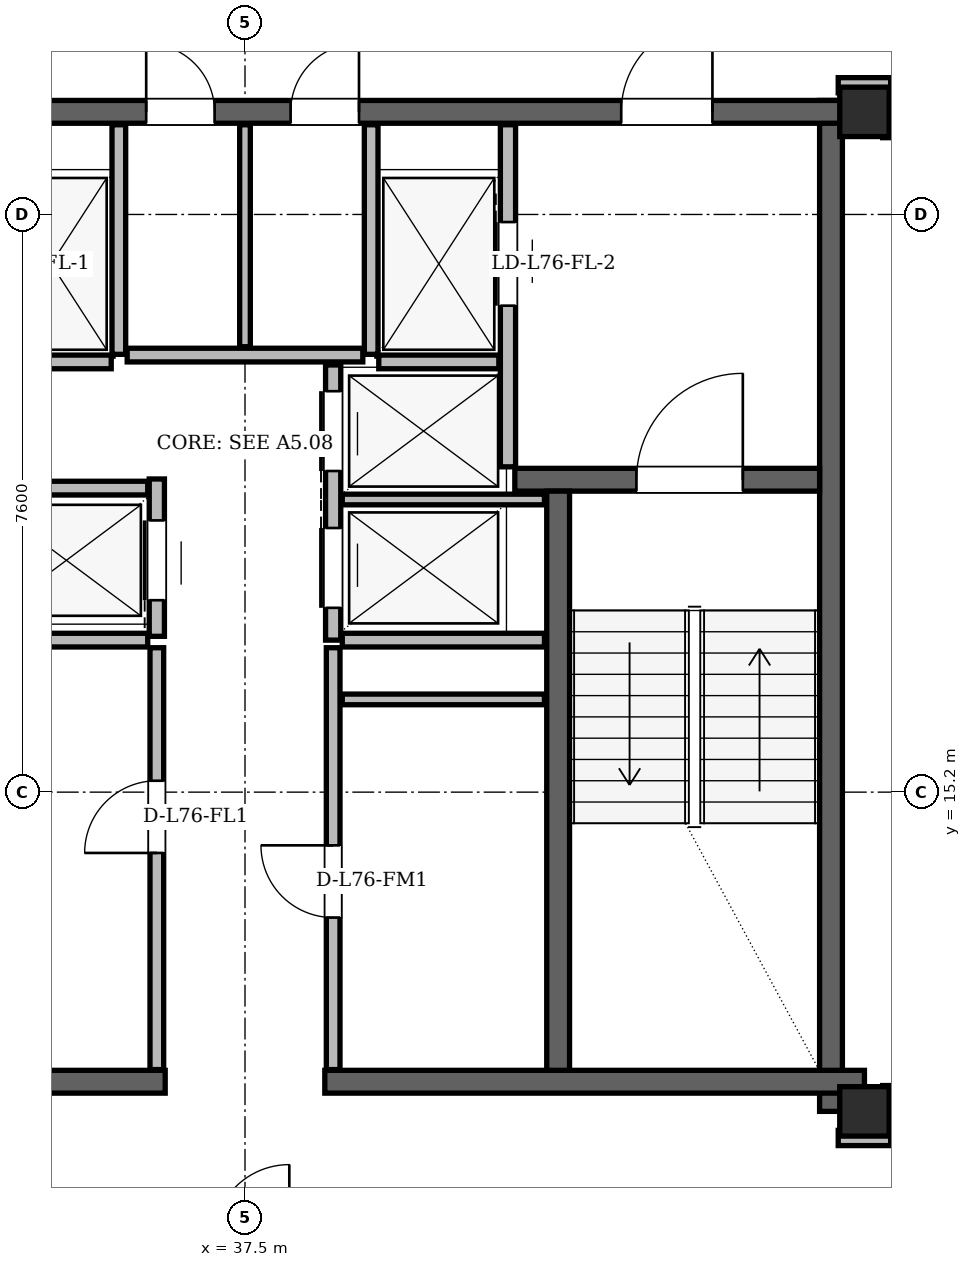
"""IFC4 building model, lengths in metres.
Left out: names, types, materials, properties, quantities, classifications, styles, units other than length and angle.
Written with IfcOpenShell. Run it as: python <this file> out.ifc"""

import sys

from ifc_helpers import new_model, si_unit, direction, frame, frame_2d, origin, origin_2d, place, context, subcontext, project, spatial, rectangle, hollow_rectangle, extrude, element, fill, save


model = new_model("IFC4")
c1 = context("Model", 3, precision=1e-05, world=origin(), true_north=direction((0.0, 1.0)))
c2 = subcontext(c1, "Body", "Model", "MODEL_VIEW")
j1 = project(units=[si_unit("LENGTHUNIT", "METRE"), si_unit("PLANEANGLEUNIT", "RADIAN")], contexts=[c1])
p1 = place(None, origin())
s1 = spatial("IfcSite", under=j1, at=p1, CompositionType="ELEMENT")
p2 = place(p1, origin())
s2 = spatial("IfcBuilding", under=s1, at=p2, CompositionType="ELEMENT")
p3 = place(p2, frame((0.0, 0.0, 288.9)))
s3 = spatial("IfcBuildingStorey", under=s2, at=p3, CompositionType="ELEMENT", Elevation=288.9)
for number, where, z_axis, x_axis in (
    (1, (45.65, 11.0, 0.0), (0.0, 0.0, 1.0), (1.0, 0.0, 0.0)),
    (2, (45.65, 24.15, 0.0), (0.0, 0.0, 1.0), (1.0, 0.0, 0.0)),
):
    element("IfcColumn", number, at=place(p3, frame(where, z_axis=z_axis, x_axis=x_axis)), inside=s3, PredefinedType="COLUMN", context=c2, shape_type="SweptSolid", body=[
        extrude(hollow_rectangle(XDim=0.65, YDim=0.65, WallThickness=0.05, at=origin_2d()), origin(), (0.0, 0.0, 1.0), 3.9),
    ])
p4 = place(p3, frame((45.21, 11.0, 0.0), z_axis=(0.0, 0.0, 1.0), x_axis=(0.0, 1.0, 0.0)))
e3 = element("IfcWall", 3, at=p4, inside=s3, PredefinedType="SHEAR", context=c2, shape_type="SweptSolid", body=[
    extrude(rectangle(XDim=13.3, YDim=0.3, at=frame_2d((6.65, 0.0))), origin(), (0.0, 0.0, 1.0), 3.68),
])
for number, where, z_axis, x_axis in (
    (4, (29.35, 11.39, 0.0), (0.0, 0.0, 1.0), (1.0, 0.0, 0.0)),
    (5, (38.55, 11.39, 0.0), (0.0, 0.0, 1.0), (1.0, 0.0, 0.0)),
):
    element("IfcWall", number, at=place(p3, frame(where, z_axis=z_axis, x_axis=x_axis)), inside=s3, PredefinedType="SHEAR", context=c2, shape_type="SweptSolid", body=[
        extrude(rectangle(XDim=7.1, YDim=0.3, at=frame_2d((3.55, 0.0))), origin(), (0.0, 0.0, 1.0), 3.68),
    ])
p5 = place(p3, frame((29.65, 24.15, 0.0), z_axis=(0.0, 0.0, 1.0), x_axis=(1.0, 0.0, 0.0)))
e6 = element("IfcWall", 6, at=p5, inside=s3, PredefinedType="SHEAR", context=c2, shape_type="SweptSolid", body=[
    extrude(rectangle(XDim=15.7, YDim=0.3, at=frame_2d((7.85, 0.0))), origin(), (0.0, 0.0, 1.0), 3.68),
])
p6 = place(p5, frame((1.7, 0.0, 0.0)))
e7 = element("IfcOpeningElement", 7, at=p6, cuts=e6, PredefinedType="OPENING", context=c2, shape_type="SweptSolid", body=[
    extrude(rectangle(XDim=1.2, YDim=2.2, at=frame_2d((0.6, 1.1))), frame((0.0, 0.15, 0.0), z_axis=(0.0, -1.0, 0.0), x_axis=(1.0, 0.0, 0.0)), (0.0, 0.0, 1.0), 0.3),
])
p7 = place(p5, frame((12.8, 0.0, 0.0)))
e8 = element("IfcOpeningElement", 8, at=p7, cuts=e6, PredefinedType="OPENING", context=c2, shape_type="SweptSolid", body=[
    extrude(rectangle(XDim=1.2, YDim=2.2, at=frame_2d((0.6, 1.1))), frame((0.0, 0.15, 0.0), z_axis=(0.0, -1.0, 0.0), x_axis=(1.0, 0.0, 0.0)), (0.0, 0.0, 1.0), 0.3),
])
p8 = place(p5, frame((6.55, 0.0, 0.0)))
e9 = element("IfcOpeningElement", 9, at=p8, cuts=e6, PredefinedType="OPENING", context=c2, shape_type="SweptSolid", body=[
    extrude(rectangle(XDim=0.9, YDim=2.05, at=frame_2d((0.45, 1.025))), frame((0.0, 0.15, 0.0), z_axis=(0.0, -1.0, 0.0), x_axis=(1.0, 0.0, 0.0)), (0.0, 0.0, 1.0), 0.3),
])
p9 = place(p5, frame((8.45, 0.0, 0.0)))
e10 = element("IfcOpeningElement", 10, at=p9, cuts=e6, PredefinedType="OPENING", context=c2, shape_type="SweptSolid", body=[
    extrude(rectangle(XDim=0.9, YDim=2.05, at=frame_2d((0.45, 1.025))), frame((0.0, 0.15, 0.0), z_axis=(0.0, -1.0, 0.0), x_axis=(1.0, 0.0, 0.0)), (0.0, 0.0, 1.0), 0.3),
])
p10 = place(p3, frame((41.05, 19.31, 0.0), z_axis=(0.0, 0.0, 1.0), x_axis=(1.0, 0.0, 0.0)))
e11 = element("IfcWall", 11, at=p10, inside=s3, PredefinedType="SHEAR", context=c2, shape_type="SweptSolid", body=[
    extrude(rectangle(XDim=4.01, YDim=0.3, at=frame_2d((2.005, 0.0))), origin(), (0.0, 0.0, 1.0), 3.68),
])
p11 = place(p10, frame((1.6, 0.0, 0.0)))
e12 = element("IfcOpeningElement", 12, at=p11, cuts=e11, PredefinedType="OPENING", context=c2, shape_type="SweptSolid", body=[
    extrude(rectangle(XDim=1.4, YDim=2.2, at=frame_2d((0.7, 1.1))), frame((0.0, 0.15, 0.0), z_axis=(0.0, -1.0, 0.0), x_axis=(1.0, 0.0, 0.0)), (0.0, 0.0, 1.0), 0.3),
])
p12 = place(p3, frame((41.62, 11.54, 0.0), z_axis=(0.0, 0.0, 1.0), x_axis=(0.0, 1.0, 0.0)))
e13 = element("IfcWall", 13, at=p12, inside=s3, PredefinedType="SHEAR", context=c2, shape_type="SweptSolid", body=[
    extrude(rectangle(XDim=7.62, YDim=0.3, at=frame_2d((3.81, 0.0))), origin(), (0.0, 0.0, 1.0), 3.68),
])
p13 = place(p3, frame((35.387, 42.986, 0.0), z_axis=(0.0, 0.0, 1.0), x_axis=(-0.499995967686, -0.86602773183, 0.0)))
e14 = element("IfcWall", 14, at=p13, inside=s3, PredefinedType="SOLIDWALL", context=c2, shape_type="SweptSolid", body=[
    extrude(rectangle(XDim=37.526, YDim=0.29, at=frame_2d((18.763, 0.0))), origin(), (0.0, 0.0, 1.0), 3.058),
])
p14 = place(p13, frame((3.74, 0.0, 0.0)))
e15 = element("IfcOpeningElement", 15, at=p14, cuts=e14, PredefinedType="OPENING", context=c2, shape_type="SweptSolid", body=[
    extrude(rectangle(XDim=1.3, YDim=2.2, at=frame_2d((0.65, 1.1))), frame((0.0, 0.145, 0.0), z_axis=(0.0, -1.0, 0.0), x_axis=(1.0, 0.0, 0.0)), (0.0, 0.0, 1.0), 0.29),
])
p15 = place(p13, frame((27.991, 0.0, 0.0)))
e16 = element("IfcOpeningElement", 16, at=p15, cuts=e14, PredefinedType="OPENING", context=c2, shape_type="SweptSolid", body=[
    extrude(rectangle(XDim=1.5, YDim=2.2, at=frame_2d((0.75, 1.1))), frame((0.0, 0.145, 0.0), z_axis=(0.0, -1.0, 0.0), x_axis=(1.0, 0.0, 0.0)), (0.0, 0.0, 1.0), 0.29),
])
p16 = place(p13, frame((35.454, 0.0, 0.85)))
e17 = element("IfcOpeningElement", 17, at=p16, cuts=e14, PredefinedType="OPENING", context=c2, shape_type="SweptSolid", body=[
    extrude(rectangle(XDim=1.2, YDim=1.48, at=frame_2d((0.6, 0.74))), frame((0.0, 0.145, 0.0), z_axis=(0.0, -1.0, 0.0), x_axis=(1.0, 0.0, 0.0)), (0.0, 0.0, 1.0), 0.29),
])
p17 = place(p13, frame((33.674, 0.0, 0.85)))
e18 = element("IfcOpeningElement", 18, at=p17, cuts=e14, PredefinedType="OPENING", context=c2, shape_type="SweptSolid", body=[
    extrude(rectangle(XDim=1.2, YDim=1.48, at=frame_2d((0.6, 0.74))), frame((0.0, 0.145, 0.0), z_axis=(0.0, -1.0, 0.0), x_axis=(1.0, 0.0, 0.0)), (0.0, 0.0, 1.0), 0.29),
])
p18 = place(p13, frame((21.746, 0.0, 0.85)))
e19 = element("IfcOpeningElement", 19, at=p18, cuts=e14, PredefinedType="OPENING", context=c2, shape_type="SweptSolid", body=[
    extrude(rectangle(XDim=1.6, YDim=1.7, at=frame_2d((0.8, 0.85))), frame((0.0, 0.145, 0.0), z_axis=(0.0, -1.0, 0.0), x_axis=(1.0, 0.0, 0.0)), (0.0, 0.0, 1.0), 0.29),
])
p19 = place(p13, frame((8.642, 0.0, 0.85)))
e20 = element("IfcOpeningElement", 20, at=p19, cuts=e14, PredefinedType="OPENING", context=c2, shape_type="SweptSolid", body=[
    extrude(rectangle(XDim=1.2, YDim=1.48, at=frame_2d((0.6, 0.74))), frame((0.0, 0.145, 0.0), z_axis=(0.0, -1.0, 0.0), x_axis=(1.0, 0.0, 0.0)), (0.0, 0.0, 1.0), 0.29),
])
p20 = place(p13, frame((16.523, 0.0, 0.85)))
e21 = element("IfcOpeningElement", 21, at=p20, cuts=e14, PredefinedType="OPENING", context=c2, shape_type="SweptSolid", body=[
    extrude(rectangle(XDim=1.8, YDim=1.75, at=frame_2d((0.9, 0.875))), frame((0.0, 0.145, 0.0), z_axis=(0.0, -1.0, 0.0), x_axis=(1.0, 0.0, 0.0)), (0.0, 0.0, 1.0), 0.29),
])
p21 = place(p13, frame((6.715, 0.0, 0.85)))
e22 = element("IfcOpeningElement", 22, at=p21, cuts=e14, PredefinedType="OPENING", context=c2, shape_type="SweptSolid", body=[
    extrude(rectangle(XDim=1.2, YDim=1.48, at=frame_2d((0.6, 0.74))), frame((0.0, 0.145, 0.0), z_axis=(0.0, -1.0, 0.0), x_axis=(1.0, 0.0, 0.0)), (0.0, 0.0, 1.0), 0.29),
])
p22 = place(p13, frame((1.125, 0.0, 0.85)))
e23 = element("IfcOpeningElement", 23, at=p22, cuts=e14, PredefinedType="OPENING", context=c2, shape_type="SweptSolid", body=[
    extrude(rectangle(XDim=1.2, YDim=1.48, at=frame_2d((0.6, 0.74))), frame((0.0, 0.145, 0.0), z_axis=(0.0, -1.0, 0.0), x_axis=(1.0, 0.0, 0.0)), (0.0, 0.0, 1.0), 0.29),
])
p23 = place(p3, frame((35.84, 20.96, 0.0), z_axis=(0.0, 0.0, 1.0), x_axis=(0.0, 1.0, 0.0)))
e24 = element("IfcWall", 24, at=p23, inside=s3, PredefinedType="PARTITIONING", context=c2, shape_type="SweptSolid", body=[
    extrude(rectangle(XDim=3.02, YDim=0.18, at=frame_2d((1.51, 0.0))), origin(), (0.0, 0.0, 1.0), 3.68),
])
p24 = place(p3, frame((34.16, 20.86, 0.0), z_axis=(0.0, 0.0, 1.0), x_axis=(1.0, 0.0, 0.0)))
e25 = element("IfcWall", 25, at=p24, inside=s3, PredefinedType="PARTITIONING", context=c2, shape_type="SweptSolid", body=[
    extrude(rectangle(XDim=1.58, YDim=0.18, at=frame_2d((0.79, 0.0))), origin(), (0.0, 0.0, 1.0), 3.68),
])
p25 = place(p3, frame((40.96, 19.48, 0.0), z_axis=(0.0, 0.0, 1.0), x_axis=(0.0, 1.0, 0.0)))
e26 = element("IfcWall", 26, at=p25, inside=s3, PredefinedType="PARTITIONING", context=c2, shape_type="SweptSolid", body=[
    extrude(rectangle(XDim=4.5, YDim=0.2, at=frame_2d((2.25, 0.0))), origin(), (0.0, 0.0, 1.0), 3.68),
])
p26 = place(p25, frame((2.12, 0.0, 0.0)))
e27 = element("IfcOpeningElement", 27, at=p26, cuts=e26, PredefinedType="OPENING", context=c2, shape_type="SweptSolid", body=[
    extrude(rectangle(XDim=1.1, YDim=2.2, at=frame_2d((0.55, 1.1))), frame((0.0, 0.1, 0.0), z_axis=(0.0, -1.0, 0.0), x_axis=(1.0, 0.0, 0.0)), (0.0, 0.0, 1.0), 0.2),
])
p27 = place(p3, frame((39.16, 20.96, 0.0), z_axis=(0.0, 0.0, 1.0), x_axis=(0.0, 1.0, 0.0)))
e28 = element("IfcWall", 28, at=p27, inside=s3, PredefinedType="PARTITIONING", context=c2, shape_type="SweptSolid", body=[
    extrude(rectangle(XDim=3.02, YDim=0.18, at=frame_2d((1.51, 0.0))), origin(), (0.0, 0.0, 1.0), 3.68),
])
p28 = place(p3, frame((39.26, 20.86, 0.0), z_axis=(0.0, 0.0, 1.0), x_axis=(1.0, 0.0, 0.0)))
e29 = element("IfcWall", 29, at=p28, inside=s3, PredefinedType="PARTITIONING", context=c2, shape_type="SweptSolid", body=[
    extrude(rectangle(XDim=1.58, YDim=0.18, at=frame_2d((0.79, 0.0))), origin(), (0.0, 0.0, 1.0), 3.68),
])
p29 = place(p3, frame((36.34, 17.25, 0.0), z_axis=(0.0, 0.0, 1.0), x_axis=(0.0, 1.0, 0.0)))
e30 = element("IfcWall", 30, at=p29, inside=s3, PredefinedType="PARTITIONING", context=c2, shape_type="SweptSolid", body=[
    extrude(rectangle(XDim=2.07, YDim=0.2, at=frame_2d((1.035, 0.0))), origin(), (0.0, 0.0, 1.0), 3.68),
])
p30 = place(p29, frame((0.475, 0.0, 0.0)))
e31 = element("IfcOpeningElement", 31, at=p30, cuts=e30, PredefinedType="OPENING", context=c2, shape_type="SweptSolid", body=[
    extrude(rectangle(XDim=1.05, YDim=2.15, at=frame_2d((0.525, 1.075))), frame((0.0, 0.1, 0.0), z_axis=(0.0, -1.0, 0.0), x_axis=(1.0, 0.0, 0.0)), (0.0, 0.0, 1.0), 0.2),
])
p31 = place(p3, frame((33.95, 19.2, 0.0), z_axis=(0.0, 0.0, 1.0), x_axis=(1.0, 0.0, 0.0)))
e32 = element("IfcWall", 32, at=p31, inside=s3, PredefinedType="PARTITIONING", context=c2, shape_type="SweptSolid", body=[
    extrude(rectangle(XDim=2.27, YDim=0.18, at=frame_2d((1.135, 0.0))), origin(), (0.0, 0.0, 1.0), 3.68),
])
p32 = place(p3, frame((33.56, 17.2, 0.0), z_axis=(0.0, 0.0, 1.0), x_axis=(1.0, 0.0, 0.0)))
e33 = element("IfcWall", 33, at=p32, inside=s3, PredefinedType="PARTITIONING", context=c2, shape_type="SweptSolid", body=[
    extrude(rectangle(XDim=2.66, YDim=0.18, at=frame_2d((1.33, 0.0))), origin(), (0.0, 0.0, 1.0), 3.68),
])
p33 = place(p3, frame((36.34, 11.55, 0.0), z_axis=(0.0, 0.0, 1.0), x_axis=(0.0, 1.0, 0.0)))
e34 = element("IfcWall", 34, at=p33, inside=s3, PredefinedType="PARTITIONING", context=c2, shape_type="SweptSolid", body=[
    extrude(rectangle(XDim=5.55, YDim=0.18, at=frame_2d((2.775, 0.0))), origin(), (0.0, 0.0, 1.0), 3.68),
])
p34 = place(p33, frame((2.85, 0.0, 0.0)))
e35 = element("IfcOpeningElement", 35, at=p34, cuts=e34, PredefinedType="OPENING", context=c2, shape_type="SweptSolid", body=[
    extrude(rectangle(XDim=0.95, YDim=2.1, at=frame_2d((0.475, 1.05))), frame((0.0, 0.09, 0.0), z_axis=(0.0, -1.0, 0.0), x_axis=(1.0, 0.0, 0.0)), (0.0, 0.0, 1.0), 0.18),
])
p35 = place(p3, frame((38.66, 17.2, 0.0), z_axis=(0.0, 0.0, 1.0), x_axis=(0.0, 1.0, 0.0)))
e36 = element("IfcWall", 36, at=p35, inside=s3, PredefinedType="PARTITIONING", context=c2, shape_type="SweptSolid", body=[
    extrude(rectangle(XDim=3.62, YDim=0.2, at=frame_2d((1.81, 0.0))), origin(), (0.0, 0.0, 1.0), 3.68),
])
p36 = place(p35, frame((0.425, 0.0, 0.0)))
e37 = element("IfcOpeningElement", 37, at=p36, cuts=e36, PredefinedType="OPENING", context=c2, shape_type="SweptSolid", body=[
    extrude(rectangle(XDim=1.05, YDim=2.15, at=frame_2d((0.525, 1.075))), frame((0.0, 0.1, 0.0), z_axis=(0.0, -1.0, 0.0), x_axis=(1.0, 0.0, 0.0)), (0.0, 0.0, 1.0), 0.2),
])
p37 = place(p35, frame((2.225, 0.0, 0.0)))
e38 = element("IfcOpeningElement", 38, at=p37, cuts=e36, PredefinedType="OPENING", context=c2, shape_type="SweptSolid", body=[
    extrude(rectangle(XDim=1.05, YDim=2.15, at=frame_2d((0.525, 1.075))), frame((0.0, 0.1, 0.0), z_axis=(0.0, -1.0, 0.0), x_axis=(1.0, 0.0, 0.0)), (0.0, 0.0, 1.0), 0.2),
])
p38 = place(p3, frame((38.78, 17.2, 0.0), z_axis=(0.0, 0.0, 1.0), x_axis=(1.0, 0.0, 0.0)))
e39 = element("IfcWall", 39, at=p38, inside=s3, PredefinedType="PARTITIONING", context=c2, shape_type="SweptSolid", body=[
    extrude(rectangle(XDim=2.66, YDim=0.18, at=frame_2d((1.33, 0.0))), origin(), (0.0, 0.0, 1.0), 3.68),
])
p39 = place(p3, frame((38.78, 19.05, 0.0), z_axis=(0.0, 0.0, 1.0), x_axis=(1.0, 0.0, 0.0)))
e40 = element("IfcWall", 40, at=p39, inside=s3, PredefinedType="PARTITIONING", context=c2, shape_type="SweptSolid", body=[
    extrude(rectangle(XDim=2.66, YDim=0.14, at=frame_2d((1.33, 0.0))), origin(), (0.0, 0.0, 1.0), 3.68),
])
p40 = place(p3, frame((38.66, 11.55, 0.0), z_axis=(0.0, 0.0, 1.0), x_axis=(0.0, 1.0, 0.0)))
e41 = element("IfcWall", 41, at=p40, inside=s3, PredefinedType="PARTITIONING", context=c2, shape_type="SweptSolid", body=[
    extrude(rectangle(XDim=5.55, YDim=0.18, at=frame_2d((2.775, 0.0))), origin(), (0.0, 0.0, 1.0), 3.68),
])
p41 = place(p40, frame((2.0, 0.0, 0.0)))
e42 = element("IfcOpeningElement", 42, at=p41, cuts=e41, PredefinedType="OPENING", context=c2, shape_type="SweptSolid", body=[
    extrude(rectangle(XDim=0.95, YDim=2.1, at=frame_2d((0.475, 1.05))), frame((0.0, 0.09, 0.0), z_axis=(0.0, -1.0, 0.0), x_axis=(1.0, 0.0, 0.0)), (0.0, 0.0, 1.0), 0.18),
])
p42 = place(p3, frame((38.78, 16.42, 0.0), z_axis=(0.0, 0.0, 1.0), x_axis=(1.0, 0.0, 0.0)))
e43 = element("IfcWall", 43, at=p42, inside=s3, PredefinedType="PARTITIONING", context=c2, shape_type="SweptSolid", body=[
    extrude(rectangle(XDim=2.66, YDim=0.14, at=frame_2d((1.33, 0.0))), origin(), (0.0, 0.0, 1.0), 3.68),
])
p43 = place(p3, frame((35.95, 20.95, 0.0), z_axis=(0.0, 0.0, 1.0), x_axis=(1.0, 0.0, 0.0)))
e44 = element("IfcWall", 44, at=p43, inside=s3, PredefinedType="PARTITIONING", context=c2, shape_type="SweptSolid", body=[
    extrude(rectangle(XDim=3.1, YDim=0.18, at=frame_2d((1.55, 0.0))), origin(), (0.0, 0.0, 1.0), 3.68),
])
p44 = place(p3, frame((37.5, 21.06, 0.0), z_axis=(0.0, 0.0, 1.0), x_axis=(0.0, 1.0, 0.0)))
e45 = element("IfcWall", 45, at=p44, inside=s3, PredefinedType="PARTITIONING", context=c2, shape_type="SweptSolid", body=[
    extrude(rectangle(XDim=2.92, YDim=0.14, at=frame_2d((1.46, 0.0))), origin(), (0.0, 0.0, 1.0), 3.68),
])
p45 = place(p3, frame((45.305, 10.65, 0.0), z_axis=(0.0, 0.0, 1.0), x_axis=(1.0, 0.0, 0.0)))
e46 = element("IfcWall", 46, at=p45, inside=s3, PredefinedType="PARTITIONING", context=c2, shape_type="SweptSolid", body=[
    extrude(rectangle(XDim=0.69, YDim=0.2, at=frame_2d((0.345, 0.0))), origin(), (0.0, 0.0, 1.0), 3.68),
])
p46 = place(p3, frame((45.305, 24.5, 0.0), z_axis=(0.0, 0.0, 1.0), x_axis=(1.0, 0.0, 0.0)))
e47 = element("IfcWall", 47, at=p46, inside=s3, PredefinedType="PARTITIONING", context=c2, shape_type="SweptSolid", body=[
    extrude(rectangle(XDim=0.69, YDim=0.2, at=frame_2d((0.345, 0.0))), origin(), (0.0, 0.0, 1.0), 3.266),
])
p47 = place(p3, frame((45.99, 10.95, 0.0), z_axis=(0.0, 0.0, 1.0), x_axis=(0.0, 1.0, 0.0)))
e48 = element("IfcWall", 48, at=p47, inside=s3, PredefinedType="PARTITIONING", context=c2, shape_type="SweptSolid", body=[
    extrude(rectangle(XDim=0.39, YDim=0.2, at=frame_2d((0.195, 0.0))), origin(), (0.0, 0.0, 1.0), 3.68),
])
p48 = place(p3, frame((45.99, 23.81, 0.0), z_axis=(0.0, 0.0, 1.0), x_axis=(0.0, 1.0, 0.0)))
e49 = element("IfcWall", 49, at=p48, inside=s3, PredefinedType="PARTITIONING", context=c2, shape_type="SweptSolid", body=[
    extrude(rectangle(XDim=0.51, YDim=0.2, at=frame_2d((0.255, 0.0))), origin(), (0.0, 0.0, 1.0), 3.68),
])
p49 = place(p34, origin())
e50 = element("IfcDoor", 50, at=p49, inside=s3, OperationType="SINGLE_SWING_LEFT", PredefinedType="DOOR", context=c2, shape_type="SweptSolid", body=[
    extrude(rectangle(XDim=0.95, YDim=2.1, at=frame_2d((0.475, 1.05))), frame((0.0, 0.025, 0.0), z_axis=(0.0, -1.0, 0.0), x_axis=(1.0, 0.0, 0.0)), (0.0, 0.0, 1.0), 0.05),
])
fill(e35, e50)
p50 = place(p41, origin())
e51 = element("IfcDoor", 51, at=p50, inside=s3, OperationType="SINGLE_SWING_RIGHT", PredefinedType="DOOR", context=c2, shape_type="SweptSolid", body=[
    extrude(rectangle(XDim=0.95, YDim=2.1, at=frame_2d((0.475, 1.05))), frame((0.0, 0.025, 0.0), z_axis=(0.0, -1.0, 0.0), x_axis=(1.0, 0.0, 0.0)), (0.0, 0.0, 1.0), 0.05),
])
fill(e42, e51)
p51 = place(p26, origin())
e52 = element("IfcDoor", 52, at=p51, inside=s3, OperationType="SLIDING_TO_RIGHT", PredefinedType="DOOR", context=c2, shape_type="SweptSolid", body=[
    extrude(rectangle(XDim=1.1, YDim=2.2, at=frame_2d((0.55, 1.1))), frame((0.0, 0.025, 0.0), z_axis=(0.0, -1.0, 0.0), x_axis=(1.0, 0.0, 0.0)), (0.0, 0.0, 1.0), 0.05),
])
fill(e27, e52)
p52 = place(p30, origin())
e53 = element("IfcDoor", 53, at=p52, inside=s3, OperationType="SLIDING_TO_LEFT", PredefinedType="DOOR", context=c2, shape_type="SweptSolid", body=[
    extrude(rectangle(XDim=1.05, YDim=2.15, at=frame_2d((0.525, 1.075))), frame((0.0, 0.025, 0.0), z_axis=(0.0, -1.0, 0.0), x_axis=(1.0, 0.0, 0.0)), (0.0, 0.0, 1.0), 0.05),
])
fill(e31, e53)
p53 = place(p36, origin())
e54 = element("IfcDoor", 54, at=p53, inside=s3, OperationType="SLIDING_TO_RIGHT", PredefinedType="DOOR", context=c2, shape_type="SweptSolid", body=[
    extrude(rectangle(XDim=1.05, YDim=2.15, at=frame_2d((0.525, 1.075))), frame((0.0, 0.025, 0.0), z_axis=(0.0, -1.0, 0.0), x_axis=(1.0, 0.0, 0.0)), (0.0, 0.0, 1.0), 0.05),
])
fill(e37, e54)
p54 = place(p37, origin())
e55 = element("IfcDoor", 55, at=p54, inside=s3, OperationType="SLIDING_TO_LEFT", PredefinedType="DOOR", context=c2, shape_type="SweptSolid", body=[
    extrude(rectangle(XDim=1.05, YDim=2.15, at=frame_2d((0.525, 1.075))), frame((0.0, 0.025, 0.0), z_axis=(0.0, -1.0, 0.0), x_axis=(1.0, 0.0, 0.0)), (0.0, 0.0, 1.0), 0.05),
])
fill(e38, e55)
p55 = place(p11, origin())
e56 = element("IfcDoor", 56, at=p55, inside=s3, OperationType="SINGLE_SWING_RIGHT", PredefinedType="DOOR", context=c2, shape_type="SweptSolid", body=[
    extrude(rectangle(XDim=1.4, YDim=2.2, at=frame_2d((0.7, 1.1))), frame((0.0, 0.025, 0.0), z_axis=(0.0, -1.0, 0.0), x_axis=(1.0, 0.0, 0.0)), (0.0, 0.0, 1.0), 0.05),
])
fill(e12, e56)
p56 = place(p7, origin())
e57 = element("IfcDoor", 57, at=p56, inside=s3, OperationType="SINGLE_SWING_RIGHT", PredefinedType="DOOR", context=c2, shape_type="SweptSolid", body=[
    extrude(rectangle(XDim=1.2, YDim=2.2, at=frame_2d((0.6, 1.1))), frame((0.0, 0.025, 0.0), z_axis=(0.0, -1.0, 0.0), x_axis=(1.0, 0.0, 0.0)), (0.0, 0.0, 1.0), 0.05),
])
fill(e8, e57)
p57 = place(p8, origin())
e58 = element("IfcDoor", 58, at=p57, inside=s3, OperationType="SINGLE_SWING_LEFT", PredefinedType="DOOR", context=c2, shape_type="SweptSolid", body=[
    extrude(rectangle(XDim=0.9, YDim=2.05, at=frame_2d((0.45, 1.025))), frame((0.0, 0.025, 0.0), z_axis=(0.0, -1.0, 0.0), x_axis=(1.0, 0.0, 0.0)), (0.0, 0.0, 1.0), 0.05),
])
fill(e9, e58)
p58 = place(p9, origin())
e59 = element("IfcDoor", 59, at=p58, inside=s3, OperationType="SINGLE_SWING_RIGHT", PredefinedType="DOOR", context=c2, shape_type="SweptSolid", body=[
    extrude(rectangle(XDim=0.9, YDim=2.05, at=frame_2d((0.45, 1.025))), frame((0.0, 0.025, 0.0), z_axis=(0.0, -1.0, 0.0), x_axis=(1.0, 0.0, 0.0)), (0.0, 0.0, 1.0), 0.05),
])
fill(e10, e59)
save(model, sys.argv[1])
